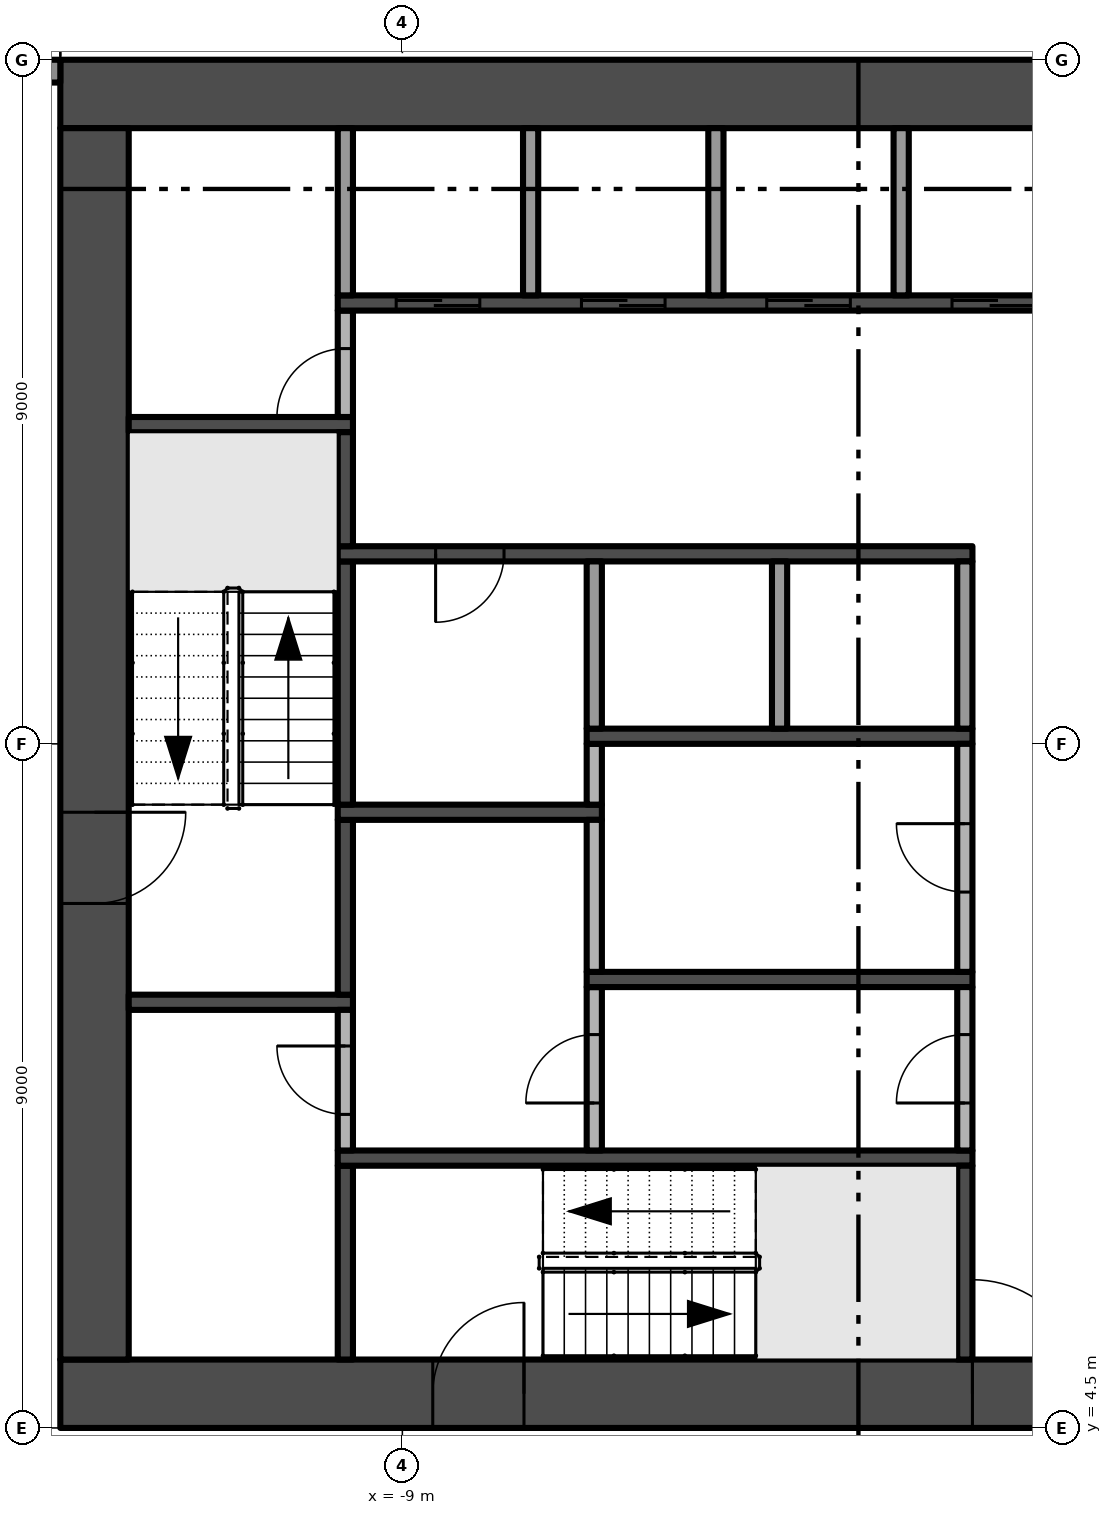
"""IFC4 building model, lengths in metres.
Left out: names, types, materials, properties, quantities, classifications, styles, units other than length and angle.
Written with IfcOpenShell. Run it as: python <this file> out.ifc"""

import sys

from ifc_helpers import new_model, si_unit, direction, frame, frame_2d, origin, place, context, subcontext, project, spatial, rectangle, extrude, element, fill, save


model = new_model("IFC4")
c1 = context("Model", 3, precision=1e-05, world=origin(), true_north=direction((0.0, 1.0)))
c2 = subcontext(c1, "Body", "Model", "MODEL_VIEW")
j1 = project(units=[si_unit("LENGTHUNIT", "METRE"), si_unit("PLANEANGLEUNIT", "RADIAN")], contexts=[c1])
p1 = place(None, origin())
s1 = spatial("IfcSite", under=j1, at=p1, CompositionType="ELEMENT")
p2 = place(p1, origin())
s2 = spatial("IfcBuilding", under=s1, at=p2, CompositionType="ELEMENT")
p3 = place(p2, frame((0.0, 0.0, 107.4)))
s3 = spatial("IfcBuildingStorey", under=s2, at=p3, CompositionType="ELEMENT", Elevation=107.4)
p4 = place(p3, frame((-13.5, 4.95, -0.3), z_axis=(0.0, 0.0, 1.0), x_axis=(1.0, 0.0, 0.0)))
e1 = element("IfcWall", 1, at=p4, inside=s3, PredefinedType="SHEAR", context=c2, shape_type="SweptSolid", body=[
    extrude(rectangle(XDim=27.0, YDim=0.9, at=frame_2d((13.5, 0.0))), origin(), (0.0, 0.0, 1.0), 3.8),
])
p5 = place(p4, frame((12.0, 0.0, 0.3)))
e2 = element("IfcOpeningElement", 2, at=p5, cuts=e1, PredefinedType="OPENING", context=c2, shape_type="SweptSolid", body=[
    extrude(rectangle(XDim=3.0, YDim=2.4, at=frame_2d((1.5, 1.2))), frame((0.0, 0.46, 0.0), z_axis=(0.0, -1.0, 0.0), x_axis=(1.0, 0.0, 0.0)), (0.0, 0.0, 1.0), 0.92),
])
p6 = place(p4, frame((4.9, 0.0, 0.3)))
e3 = element("IfcOpeningElement", 3, at=p6, cuts=e1, PredefinedType="OPENING", context=c2, shape_type="SweptSolid", body=[
    extrude(rectangle(XDim=1.2, YDim=2.2, at=frame_2d((0.6, 1.1))), frame((0.0, 0.46, 0.0), z_axis=(0.0, -1.0, 0.0), x_axis=(1.0, 0.0, 0.0)), (0.0, 0.0, 1.0), 0.92),
])
p7 = place(p4, frame((20.75, 0.0, 0.3)))
e4 = element("IfcOpeningElement", 4, at=p7, cuts=e1, PredefinedType="OPENING", context=c2, shape_type="SweptSolid", body=[
    extrude(rectangle(XDim=1.5, YDim=2.2, at=frame_2d((0.75, 1.1))), frame((0.0, 0.46, 0.0), z_axis=(0.0, -1.0, 0.0), x_axis=(1.0, 0.0, 0.0)), (0.0, 0.0, 1.0), 0.92),
])
p8 = place(p4, frame((17.4, 0.0, 0.3)))
e5 = element("IfcOpeningElement", 5, at=p8, cuts=e1, PredefinedType="OPENING", context=c2, shape_type="SweptSolid", body=[
    extrude(rectangle(XDim=1.2, YDim=2.2, at=frame_2d((0.6, 1.1))), frame((0.0, 0.46, 0.0), z_axis=(0.0, -1.0, 0.0), x_axis=(1.0, 0.0, 0.0)), (0.0, 0.0, 1.0), 0.92),
])
p9 = place(p3, frame((13.5, 22.05, -0.3), z_axis=(0.0, 0.0, 1.0), x_axis=(-1.0, 0.0, 0.0)))
e6 = element("IfcWall", 6, at=p9, inside=s3, PredefinedType="SHEAR", context=c2, shape_type="SweptSolid", body=[
    extrude(rectangle(XDim=27.0, YDim=0.9, at=frame_2d((13.5, 0.0))), origin(), (0.0, 0.0, 1.0), 3.8),
])
p10 = place(p3, frame((-13.05, 21.6, -0.3), z_axis=(0.0, 0.0, 1.0), x_axis=(0.0, -1.0, 0.0)))
e7 = element("IfcWall", 7, at=p10, inside=s3, PredefinedType="SHEAR", context=c2, shape_type="SweptSolid", body=[
    extrude(rectangle(XDim=16.2, YDim=0.9, at=frame_2d((8.1, 0.0))), origin(), (0.0, 0.0, 1.0), 3.8),
])
p11 = place(p10, frame((9.0, 0.0, 0.3)))
e8 = element("IfcOpeningElement", 8, at=p11, cuts=e7, PredefinedType="OPENING", context=c2, shape_type="SweptSolid", body=[
    extrude(rectangle(XDim=1.2, YDim=2.2, at=frame_2d((0.6, 1.1))), frame((0.0, 0.46, 0.0), z_axis=(0.0, -1.0, 0.0), x_axis=(1.0, 0.0, 0.0)), (0.0, 0.0, 1.0), 0.92),
])
p12 = place(p3, frame((-17.375, 22.35, 0.0), z_axis=(0.0, 0.0, 1.0), x_axis=(1.0, 0.0, 0.0)))
e9 = element("IfcWall", 9, at=p12, inside=s3, PredefinedType="SOLIDWALL", context=c2, shape_type="SweptSolid", body=[
    extrude(rectangle(XDim=3.875, YDim=0.3, at=frame_2d((1.938, 0.0))), origin(), (0.0, 0.0, 1.0), 3.5),
])
p13 = place(p12, frame((0.325, 0.0, 0.0)))
e10 = element("IfcOpeningElement", 10, at=p13, cuts=e9, PredefinedType="OPENING", context=c2, shape_type="SweptSolid", body=[
    extrude(rectangle(XDim=2.775, YDim=2.4, at=frame_2d((1.387, 1.2))), frame((0.0, 0.16, 0.0), z_axis=(0.0, -1.0, 0.0), x_axis=(1.0, 0.0, 0.0)), (0.0, 0.0, 1.0), 0.32),
])
for number, where, z_axis, x_axis in (
    (11, (-12.6, 10.1, 0.0), (0.0, 0.0, 1.0), (1.0, 0.0, 0.0)),
    (12, (-12.6, 17.7, 0.0), (0.0, 0.0, 1.0), (1.0, 0.0, 0.0)),
):
    element("IfcWall", number, at=place(p3, frame(where, z_axis=z_axis, x_axis=x_axis)), inside=s3, PredefinedType="SHEAR", context=c2, shape_type="SweptSolid", body=[
        extrude(rectangle(XDim=2.95, YDim=0.2, at=frame_2d((1.475, 0.0))), origin(), (0.0, 0.0, 1.0), 3.5),
    ])
p14 = place(p3, frame((-9.75, 5.4, 0.0), z_axis=(0.0, 0.0, 1.0), x_axis=(0.0, 1.0, 0.0)))
e13 = element("IfcWall", 13, at=p14, inside=s3, PredefinedType="SHEAR", context=c2, shape_type="SweptSolid", body=[
    extrude(rectangle(XDim=2.55, YDim=0.2, at=frame_2d((1.275, 0.0))), origin(), (0.0, 0.0, 1.0), 3.5),
])
p15 = place(p3, frame((-9.85, 8.05, 0.0), z_axis=(0.0, 0.0, 1.0), x_axis=(1.0, 0.0, 0.0)))
e14 = element("IfcWall", 14, at=p15, inside=s3, PredefinedType="SHEAR", context=c2, shape_type="SweptSolid", body=[
    extrude(rectangle(XDim=8.35, YDim=0.2, at=frame_2d((4.175, 0.0))), origin(), (0.0, 0.0, 1.0), 3.5),
])
p16 = place(p3, frame((-9.75, 8.15, 0.0), z_axis=(0.0, 0.0, 1.0), x_axis=(0.0, 1.0, 0.0)))
e15 = element("IfcWall", 15, at=p16, inside=s3, PredefinedType="PARTITIONING", context=c2, shape_type="SweptSolid", body=[
    extrude(rectangle(XDim=1.85, YDim=0.2, at=frame_2d((0.925, 0.0))), origin(), (0.0, 0.0, 1.0), 3.5),
])
p17 = place(p16, frame((0.475, 0.0, 0.0)))
e16 = element("IfcOpeningElement", 16, at=p17, cuts=e15, PredefinedType="OPENING", context=c2, shape_type="SweptSolid", body=[
    extrude(rectangle(XDim=0.9, YDim=2.1, at=frame_2d((0.45, 1.05))), frame((0.0, 0.11, 0.0), z_axis=(0.0, -1.0, 0.0), x_axis=(1.0, 0.0, 0.0)), (0.0, 0.0, 1.0), 0.22),
])
p18 = place(p3, frame((-9.75, 10.2, 0.0), z_axis=(0.0, 0.0, 1.0), x_axis=(0.0, 1.0, 0.0)))
e17 = element("IfcWall", 17, at=p18, inside=s3, PredefinedType="SHEAR", context=c2, shape_type="SweptSolid", body=[
    extrude(rectangle(XDim=2.3, YDim=0.2, at=frame_2d((1.15, 0.0))), origin(), (0.0, 0.0, 1.0), 3.5),
])
p19 = place(p3, frame((-9.85, 12.6, 0.0), z_axis=(0.0, 0.0, 1.0), x_axis=(1.0, 0.0, 0.0)))
e18 = element("IfcWall", 18, at=p19, inside=s3, PredefinedType="SHEAR", context=c2, shape_type="SweptSolid", body=[
    extrude(rectangle(XDim=3.475, YDim=0.2, at=frame_2d((1.738, 0.0))), origin(), (0.0, 0.0, 1.0), 3.5),
])
p20 = place(p3, frame((-9.75, 12.7, 0.0), z_axis=(0.0, 0.0, 1.0), x_axis=(0.0, 1.0, 0.0)))
e19 = element("IfcWall", 19, at=p20, inside=s3, PredefinedType="SHEAR", context=c2, shape_type="SweptSolid", body=[
    extrude(rectangle(XDim=3.2, YDim=0.2, at=frame_2d((1.6, 0.0))), origin(), (0.0, 0.0, 1.0), 3.5),
])
p21 = place(p3, frame((-1.5, 16.0, 0.0), z_axis=(0.0, 0.0, 1.0), x_axis=(-1.0, 0.0, 0.0)))
e20 = element("IfcWall", 20, at=p21, inside=s3, PredefinedType="SHEAR", context=c2, shape_type="SweptSolid", body=[
    extrude(rectangle(XDim=8.35, YDim=0.2, at=frame_2d((4.175, 0.0))), origin(), (0.0, 0.0, 1.0), 3.5),
])
p22 = place(p21, frame((6.162, 0.0, 0.0)))
e21 = element("IfcOpeningElement", 21, at=p22, cuts=e20, PredefinedType="OPENING", context=c2, shape_type="SweptSolid", body=[
    extrude(rectangle(XDim=0.9, YDim=2.1, at=frame_2d((0.45, 1.05))), frame((0.0, 0.11, 0.0), z_axis=(0.0, -1.0, 0.0), x_axis=(1.0, 0.0, 0.0)), (0.0, 0.0, 1.0), 0.22),
])
p23 = place(p3, frame((-9.75, 16.1, 0.0), z_axis=(0.0, 0.0, 1.0), x_axis=(0.0, 1.0, 0.0)))
e22 = element("IfcWall", 22, at=p23, inside=s3, PredefinedType="SHEAR", context=c2, shape_type="SweptSolid", body=[
    extrude(rectangle(XDim=1.5, YDim=0.2, at=frame_2d((0.75, 0.0))), origin(), (0.0, 0.0, 1.0), 3.5),
])
p24 = place(p3, frame((-9.75, 17.8, 0.0), z_axis=(0.0, 0.0, 1.0), x_axis=(0.0, 1.0, 0.0)))
e23 = element("IfcWall", 23, at=p24, inside=s3, PredefinedType="PARTITIONING", context=c2, shape_type="SweptSolid", body=[
    extrude(rectangle(XDim=1.4, YDim=0.2, at=frame_2d((0.7, 0.0))), origin(), (0.0, 0.0, 1.0), 3.5),
])
p25 = place(p24, origin())
e24 = element("IfcOpeningElement", 24, at=p25, cuts=e23, PredefinedType="OPENING", context=c2, shape_type="SweptSolid", body=[
    extrude(rectangle(XDim=0.9, YDim=2.1, at=frame_2d((0.45, 1.05))), frame((0.0, 0.11, 0.0), z_axis=(0.0, -1.0, 0.0), x_axis=(1.0, 0.0, 0.0)), (0.0, 0.0, 1.0), 0.22),
])
p26 = place(p3, frame((-9.85, 19.3, 0.0), z_axis=(0.0, 0.0, 1.0), x_axis=(1.0, 0.0, 0.0)))
e25 = element("IfcWall", 25, at=p26, inside=s3, PredefinedType="SHEAR", context=c2, shape_type="SweptSolid", body=[
    extrude(rectangle(XDim=19.7, YDim=0.2, at=frame_2d((9.85, 0.0))), origin(), (0.0, 0.0, 1.0), 3.5),
])
p27 = place(p26, frame((0.769, 0.0, 0.0)))
e26 = element("IfcOpeningElement", 26, at=p27, cuts=e25, PredefinedType="OPENING", context=c2, shape_type="SweptSolid", body=[
    extrude(rectangle(XDim=1.1, YDim=2.1, at=frame_2d((0.55, 1.05))), frame((0.0, 0.11, 0.0), z_axis=(0.0, -1.0, 0.0), x_axis=(1.0, 0.0, 0.0)), (0.0, 0.0, 1.0), 0.22),
])
p28 = place(p26, frame((3.206, 0.0, 0.0)))
e27 = element("IfcOpeningElement", 27, at=p28, cuts=e25, PredefinedType="OPENING", context=c2, shape_type="SweptSolid", body=[
    extrude(rectangle(XDim=1.1, YDim=2.1, at=frame_2d((0.55, 1.05))), frame((0.0, 0.11, 0.0), z_axis=(0.0, -1.0, 0.0), x_axis=(1.0, 0.0, 0.0)), (0.0, 0.0, 1.0), 0.22),
])
p29 = place(p26, frame((5.644, 0.0, 0.0)))
e28 = element("IfcOpeningElement", 28, at=p29, cuts=e25, PredefinedType="OPENING", context=c2, shape_type="SweptSolid", body=[
    extrude(rectangle(XDim=1.1, YDim=2.1, at=frame_2d((0.55, 1.05))), frame((0.0, 0.11, 0.0), z_axis=(0.0, -1.0, 0.0), x_axis=(1.0, 0.0, 0.0)), (0.0, 0.0, 1.0), 0.22),
])
p30 = place(p26, frame((8.081, 0.0, 0.0)))
e29 = element("IfcOpeningElement", 29, at=p30, cuts=e25, PredefinedType="OPENING", context=c2, shape_type="SweptSolid", body=[
    extrude(rectangle(XDim=1.1, YDim=2.1, at=frame_2d((0.55, 1.05))), frame((0.0, 0.11, 0.0), z_axis=(0.0, -1.0, 0.0), x_axis=(1.0, 0.0, 0.0)), (0.0, 0.0, 1.0), 0.22),
])
for number, where, z_axis, x_axis in (
    (30, (-9.75, 19.4, 0.0), (0.0, 0.0, 1.0), (0.0, 1.0, 0.0)),
    (31, (-7.312, 19.4, 0.0), (0.0, 0.0, 1.0), (0.0, 1.0, 0.0)),
):
    element("IfcWall", number, at=place(p3, frame(where, z_axis=z_axis, x_axis=x_axis)), inside=s3, PredefinedType="PARTITIONING", context=c2, shape_type="SweptSolid", body=[
        extrude(rectangle(XDim=2.2, YDim=0.2, at=frame_2d((1.1, 0.0))), origin(), (0.0, 0.0, 1.0), 3.5),
    ])
p31 = place(p3, frame((-6.475, 8.15, 0.0), z_axis=(0.0, 0.0, 1.0), x_axis=(0.0, 1.0, 0.0)))
e32 = element("IfcWall", 32, at=p31, inside=s3, PredefinedType="PARTITIONING", context=c2, shape_type="SweptSolid", body=[
    extrude(rectangle(XDim=2.15, YDim=0.2, at=frame_2d((1.075, 0.0))), origin(), (0.0, 0.0, 1.0), 3.5),
])
p32 = place(p31, frame((0.625, 0.0, 0.0)))
e33 = element("IfcOpeningElement", 33, at=p32, cuts=e32, PredefinedType="OPENING", context=c2, shape_type="SweptSolid", body=[
    extrude(rectangle(XDim=0.9, YDim=2.1, at=frame_2d((0.45, 1.05))), frame((0.0, 0.11, 0.0), z_axis=(0.0, -1.0, 0.0), x_axis=(1.0, 0.0, 0.0)), (0.0, 0.0, 1.0), 0.22),
])
p33 = place(p3, frame((-6.575, 10.4, 0.0), z_axis=(0.0, 0.0, 1.0), x_axis=(1.0, 0.0, 0.0)))
e34 = element("IfcWall", 34, at=p33, inside=s3, PredefinedType="SHEAR", context=c2, shape_type="SweptSolid", body=[
    extrude(rectangle(XDim=5.075, YDim=0.2, at=frame_2d((2.538, 0.0))), origin(), (0.0, 0.0, 1.0), 3.5),
])
p34 = place(p3, frame((-6.475, 10.5, 0.0), z_axis=(0.0, 0.0, 1.0), x_axis=(0.0, 1.0, 0.0)))
e35 = element("IfcWall", 35, at=p34, inside=s3, PredefinedType="PARTITIONING", context=c2, shape_type="SweptSolid", body=[
    extrude(rectangle(XDim=2.0, YDim=0.2, at=frame_2d((1.0, 0.0))), origin(), (0.0, 0.0, 1.0), 3.5),
])
p35 = place(p3, frame((-6.475, 12.7, 0.0), z_axis=(0.0, 0.0, 1.0), x_axis=(0.0, 1.0, 0.0)))
e36 = element("IfcWall", 36, at=p35, inside=s3, PredefinedType="PARTITIONING", context=c2, shape_type="SweptSolid", body=[
    extrude(rectangle(XDim=0.8, YDim=0.2, at=frame_2d((0.4, 0.0))), origin(), (0.0, 0.0, 1.0), 3.5),
])
p36 = place(p3, frame((-6.575, 13.6, 0.0), z_axis=(0.0, 0.0, 1.0), x_axis=(1.0, 0.0, 0.0)))
e37 = element("IfcWall", 37, at=p36, inside=s3, PredefinedType="SHEAR", context=c2, shape_type="SweptSolid", body=[
    extrude(rectangle(XDim=5.075, YDim=0.2, at=frame_2d((2.538, 0.0))), origin(), (0.0, 0.0, 1.0), 3.5),
])
for number, where, z_axis, x_axis in (
    (38, (-6.475, 13.7, 0.0), (0.0, 0.0, 1.0), (0.0, 1.0, 0.0)),
    (39, (-4.875, 19.4, 0.0), (0.0, 0.0, 1.0), (0.0, 1.0, 0.0)),
    (40, (-4.037, 13.7, 0.0), (0.0, 0.0, 1.0), (0.0, 1.0, 0.0)),
    (41, (-2.438, 19.4, 0.0), (0.0, 0.0, 1.0), (0.0, 1.0, 0.0)),
):
    element("IfcWall", number, at=place(p3, frame(where, z_axis=z_axis, x_axis=x_axis)), inside=s3, PredefinedType="PARTITIONING", context=c2, shape_type="SweptSolid", body=[
        extrude(rectangle(XDim=2.2, YDim=0.2, at=frame_2d((1.1, 0.0))), origin(), (0.0, 0.0, 1.0), 3.5),
    ])
p37 = place(p3, frame((-1.6, 5.4, 0.0), z_axis=(0.0, 0.0, 1.0), x_axis=(0.0, 1.0, 0.0)))
e42 = element("IfcWall", 42, at=p37, inside=s3, PredefinedType="SHEAR", context=c2, shape_type="SweptSolid", body=[
    extrude(rectangle(XDim=2.55, YDim=0.2, at=frame_2d((1.275, 0.0))), origin(), (0.0, 0.0, 1.0), 3.5),
])
p38 = place(p3, frame((-1.6, 8.15, 0.0), z_axis=(0.0, 0.0, 1.0), x_axis=(0.0, 1.0, 0.0)))
e43 = element("IfcWall", 43, at=p38, inside=s3, PredefinedType="PARTITIONING", context=c2, shape_type="SweptSolid", body=[
    extrude(rectangle(XDim=2.15, YDim=0.2, at=frame_2d((1.075, 0.0))), origin(), (0.0, 0.0, 1.0), 3.5),
])
p39 = place(p38, frame((0.625, 0.0, 0.0)))
e44 = element("IfcOpeningElement", 44, at=p39, cuts=e43, PredefinedType="OPENING", context=c2, shape_type="SweptSolid", body=[
    extrude(rectangle(XDim=0.9, YDim=2.1, at=frame_2d((0.45, 1.05))), frame((0.0, 0.11, 0.0), z_axis=(0.0, -1.0, 0.0), x_axis=(1.0, 0.0, 0.0)), (0.0, 0.0, 1.0), 0.22),
])
p40 = place(p3, frame((-1.6, 10.5, 0.0), z_axis=(0.0, 0.0, 1.0), x_axis=(0.0, 1.0, 0.0)))
e45 = element("IfcWall", 45, at=p40, inside=s3, PredefinedType="PARTITIONING", context=c2, shape_type="SweptSolid", body=[
    extrude(rectangle(XDim=3.0, YDim=0.2, at=frame_2d((1.5, 0.0))), origin(), (0.0, 0.0, 1.0), 3.5),
])
p41 = place(p40, frame((1.05, 0.0, 0.0)))
e46 = element("IfcOpeningElement", 46, at=p41, cuts=e45, PredefinedType="OPENING", context=c2, shape_type="SweptSolid", body=[
    extrude(rectangle(XDim=0.9, YDim=2.1, at=frame_2d((0.45, 1.05))), frame((0.0, 0.11, 0.0), z_axis=(0.0, -1.0, 0.0), x_axis=(1.0, 0.0, 0.0)), (0.0, 0.0, 1.0), 0.22),
])
p42 = place(p3, frame((-1.6, 13.7, 0.0), z_axis=(0.0, 0.0, 1.0), x_axis=(0.0, 1.0, 0.0)))
e47 = element("IfcWall", 47, at=p42, inside=s3, PredefinedType="PARTITIONING", context=c2, shape_type="SweptSolid", body=[
    extrude(rectangle(XDim=2.2, YDim=0.2, at=frame_2d((1.1, 0.0))), origin(), (0.0, 0.0, 1.0), 3.5),
])
p43 = place(p5, frame((3.0, 0.0, 0.0), z_axis=(0.0, 0.0, 1.0), x_axis=(-1.0, 0.0, 0.0)))
e48 = element("IfcDoor", 48, at=p43, inside=s3, OperationType="DOUBLE_DOOR_SINGLE_SWING", PredefinedType="DOOR", context=c2, shape_type="SweptSolid", body=[
    extrude(rectangle(XDim=3.0, YDim=2.4, at=frame_2d((1.5, 1.2))), frame((0.0, 0.025, 0.0), z_axis=(0.0, -1.0, 0.0), x_axis=(1.0, 0.0, 0.0)), (0.0, 0.0, 1.0), 0.05),
])
fill(e2, e48)
p44 = place(p11, frame((1.2, 0.0, 0.0), z_axis=(0.0, 0.0, 1.0), x_axis=(-1.0, 0.0, 0.0)))
e49 = element("IfcDoor", 49, at=p44, inside=s3, OperationType="SINGLE_SWING_RIGHT", PredefinedType="DOOR", context=c2, shape_type="SweptSolid", body=[
    extrude(rectangle(XDim=1.2, YDim=2.2, at=frame_2d((0.6, 1.1))), frame((0.0, 0.025, 0.0), z_axis=(0.0, -1.0, 0.0), x_axis=(1.0, 0.0, 0.0)), (0.0, 0.0, 1.0), 0.05),
])
fill(e8, e49)
p45 = place(p6, frame((1.2, 0.0, 0.0), z_axis=(0.0, 0.0, 1.0), x_axis=(-1.0, 0.0, 0.0)))
e50 = element("IfcDoor", 50, at=p45, inside=s3, OperationType="SINGLE_SWING_LEFT", PredefinedType="DOOR", context=c2, shape_type="SweptSolid", body=[
    extrude(rectangle(XDim=1.2, YDim=2.2, at=frame_2d((0.6, 1.1))), frame((0.0, 0.025, 0.0), z_axis=(0.0, -1.0, 0.0), x_axis=(1.0, 0.0, 0.0)), (0.0, 0.0, 1.0), 0.05),
])
fill(e3, e50)
p46 = place(p27, origin())
e51 = element("IfcDoor", 51, at=p46, inside=s3, OperationType="SLIDING_TO_LEFT", PredefinedType="DOOR", context=c2, shape_type="SweptSolid", body=[
    extrude(rectangle(XDim=1.1, YDim=2.1, at=frame_2d((0.55, 1.05))), frame((0.0, 0.025, 0.0), z_axis=(0.0, -1.0, 0.0), x_axis=(1.0, 0.0, 0.0)), (0.0, 0.0, 1.0), 0.05),
])
fill(e26, e51)
p47 = place(p28, origin())
e52 = element("IfcDoor", 52, at=p47, inside=s3, OperationType="SLIDING_TO_LEFT", PredefinedType="DOOR", context=c2, shape_type="SweptSolid", body=[
    extrude(rectangle(XDim=1.1, YDim=2.1, at=frame_2d((0.55, 1.05))), frame((0.0, 0.025, 0.0), z_axis=(0.0, -1.0, 0.0), x_axis=(1.0, 0.0, 0.0)), (0.0, 0.0, 1.0), 0.05),
])
fill(e27, e52)
p48 = place(p29, origin())
e53 = element("IfcDoor", 53, at=p48, inside=s3, OperationType="SLIDING_TO_LEFT", PredefinedType="DOOR", context=c2, shape_type="SweptSolid", body=[
    extrude(rectangle(XDim=1.1, YDim=2.1, at=frame_2d((0.55, 1.05))), frame((0.0, 0.025, 0.0), z_axis=(0.0, -1.0, 0.0), x_axis=(1.0, 0.0, 0.0)), (0.0, 0.0, 1.0), 0.05),
])
fill(e28, e53)
p49 = place(p30, origin())
e54 = element("IfcDoor", 54, at=p49, inside=s3, OperationType="SLIDING_TO_LEFT", PredefinedType="DOOR", context=c2, shape_type="SweptSolid", body=[
    extrude(rectangle(XDim=1.1, YDim=2.1, at=frame_2d((0.55, 1.05))), frame((0.0, 0.025, 0.0), z_axis=(0.0, -1.0, 0.0), x_axis=(1.0, 0.0, 0.0)), (0.0, 0.0, 1.0), 0.05),
])
fill(e29, e54)
p50 = place(p22, origin())
e55 = element("IfcDoor", 55, at=p50, inside=s3, OperationType="SINGLE_SWING_RIGHT", PredefinedType="DOOR", context=c2, shape_type="SweptSolid", body=[
    extrude(rectangle(XDim=0.9, YDim=2.1, at=frame_2d((0.45, 1.05))), frame((0.0, 0.025, 0.0), z_axis=(0.0, -1.0, 0.0), x_axis=(1.0, 0.0, 0.0)), (0.0, 0.0, 1.0), 0.05),
])
fill(e21, e55)
p51 = place(p39, origin())
e56 = element("IfcDoor", 56, at=p51, inside=s3, OperationType="SINGLE_SWING_LEFT", PredefinedType="DOOR", context=c2, shape_type="SweptSolid", body=[
    extrude(rectangle(XDim=0.9, YDim=2.1, at=frame_2d((0.45, 1.05))), frame((0.0, 0.025, 0.0), z_axis=(0.0, -1.0, 0.0), x_axis=(1.0, 0.0, 0.0)), (0.0, 0.0, 1.0), 0.05),
])
fill(e44, e56)
p52 = place(p41, origin())
e57 = element("IfcDoor", 57, at=p52, inside=s3, OperationType="SINGLE_SWING_RIGHT", PredefinedType="DOOR", context=c2, shape_type="SweptSolid", body=[
    extrude(rectangle(XDim=0.9, YDim=2.1, at=frame_2d((0.45, 1.05))), frame((0.0, 0.025, 0.0), z_axis=(0.0, -1.0, 0.0), x_axis=(1.0, 0.0, 0.0)), (0.0, 0.0, 1.0), 0.05),
])
fill(e46, e57)
p53 = place(p25, origin())
e58 = element("IfcDoor", 58, at=p53, inside=s3, OperationType="SINGLE_SWING_LEFT", PredefinedType="DOOR", context=c2, shape_type="SweptSolid", body=[
    extrude(rectangle(XDim=0.9, YDim=2.1, at=frame_2d((0.45, 1.05))), frame((0.0, 0.025, 0.0), z_axis=(0.0, -1.0, 0.0), x_axis=(1.0, 0.0, 0.0)), (0.0, 0.0, 1.0), 0.05),
])
fill(e24, e58)
p54 = place(p32, origin())
e59 = element("IfcDoor", 59, at=p54, inside=s3, OperationType="SINGLE_SWING_LEFT", PredefinedType="DOOR", context=c2, shape_type="SweptSolid", body=[
    extrude(rectangle(XDim=0.9, YDim=2.1, at=frame_2d((0.45, 1.05))), frame((0.0, 0.025, 0.0), z_axis=(0.0, -1.0, 0.0), x_axis=(1.0, 0.0, 0.0)), (0.0, 0.0, 1.0), 0.05),
])
fill(e33, e59)
p55 = place(p17, origin())
e60 = element("IfcDoor", 60, at=p55, inside=s3, OperationType="SINGLE_SWING_RIGHT", PredefinedType="DOOR", context=c2, shape_type="SweptSolid", body=[
    extrude(rectangle(XDim=0.9, YDim=2.1, at=frame_2d((0.45, 1.05))), frame((0.0, 0.025, 0.0), z_axis=(0.0, -1.0, 0.0), x_axis=(1.0, 0.0, 0.0)), (0.0, 0.0, 1.0), 0.05),
])
fill(e16, e60)
save(model, sys.argv[1])
